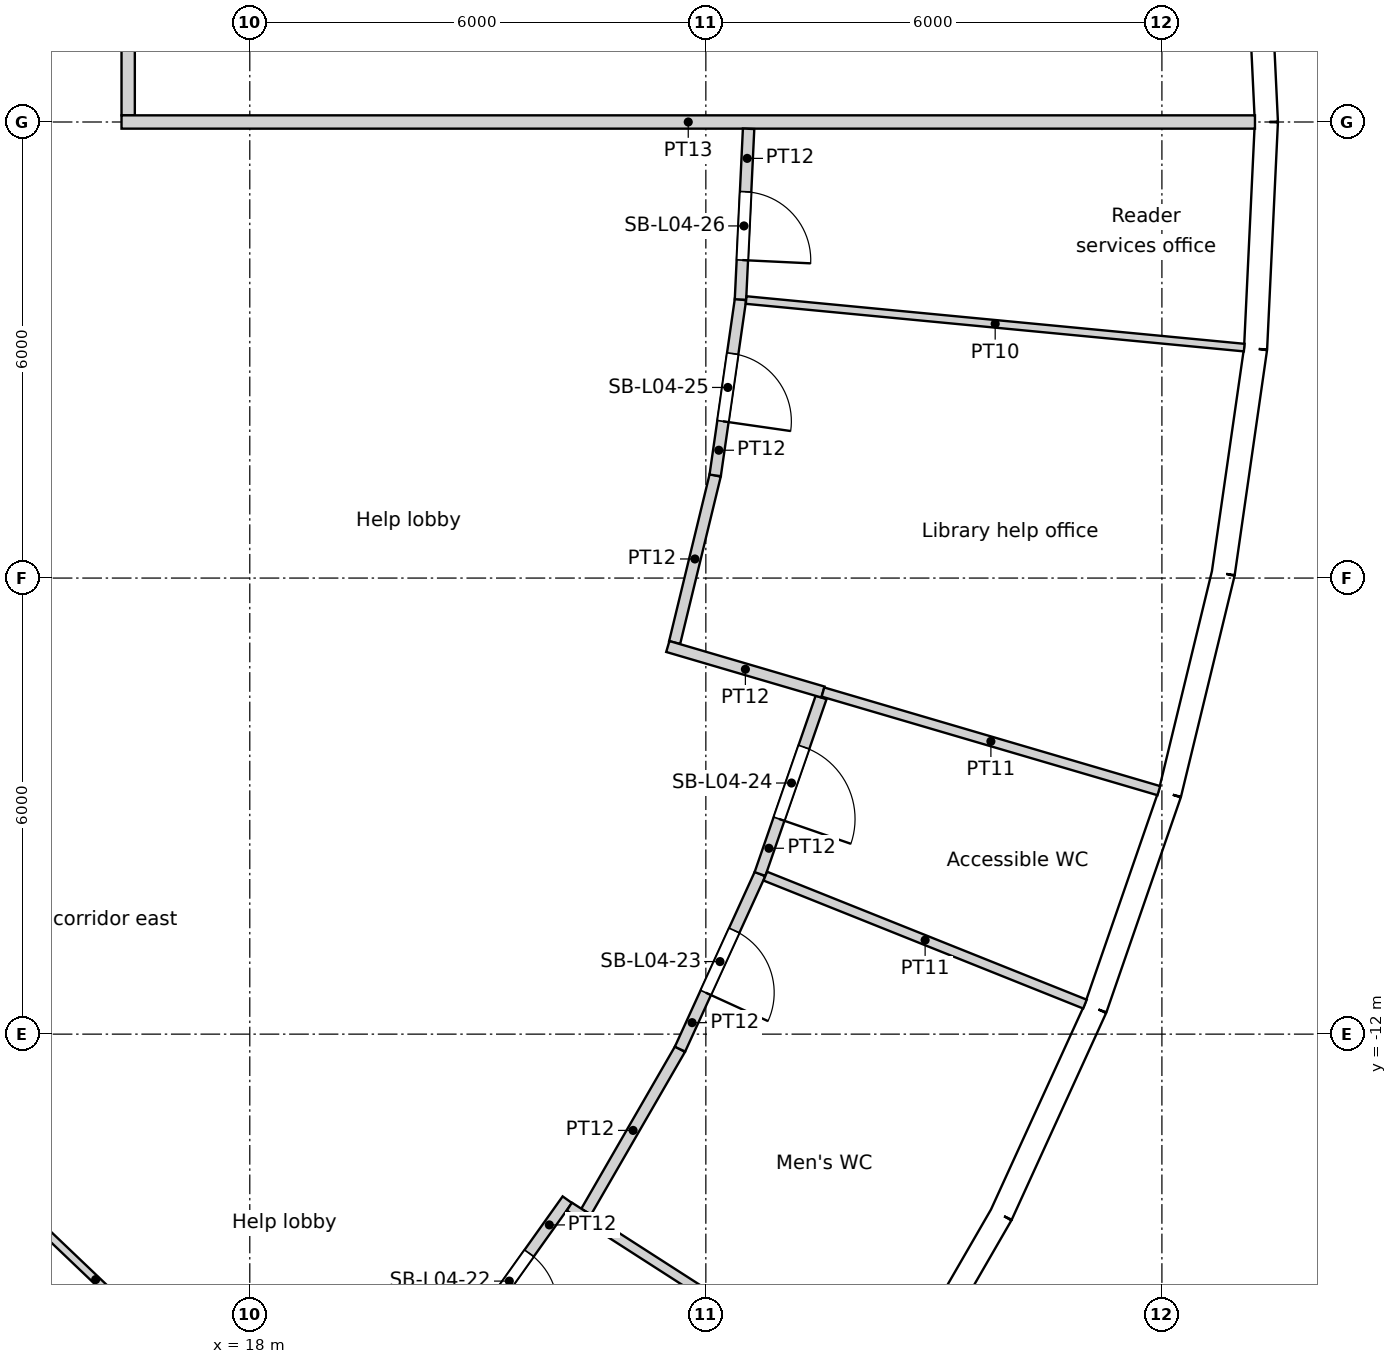
"""IFC4 building model, lengths in metres.
Left out: names, types, materials, properties, quantities, classifications, styles, units other than length and angle.
Written with IfcOpenShell. Run it as: python <this file> out.ifc"""

import sys

from ifc_helpers import new_model, si_unit, direction, frame, frame_2d, origin, origin_2d, place, context, subcontext, project, spatial, rectangle, circle, extrude, element, fill, save


model = new_model("IFC4")
c1 = context("Model", 3, precision=1e-05, world=origin(), true_north=direction((0.0, 1.0)))
c2 = subcontext(c1, "Body", "Model", "MODEL_VIEW")
j1 = project(units=[si_unit("LENGTHUNIT", "METRE"), si_unit("PLANEANGLEUNIT", "RADIAN")], contexts=[c1])
p1 = place(None, origin())
s1 = spatial("IfcSite", under=j1, at=p1, CompositionType="ELEMENT")
p2 = place(p1, origin())
s2 = spatial("IfcBuilding", under=s1, at=p2, CompositionType="ELEMENT")
p3 = place(p2, frame((0.0, 0.0, 23.4)))
s3 = spatial("IfcBuildingStorey", under=s2, at=p3, CompositionType="ELEMENT", Elevation=23.4)
for number, where, z_axis, x_axis in (
    (1, (30.275, 0.0, 0.0), (0.0, 0.0, 1.0), (1.0, 0.0, 0.0)),
    (2, (28.106, -11.252, 0.0), (0.0, 0.0, 1.0), (1.0, 0.0, 0.0)),
    (3, (29.728, -5.729, 0.0), (0.0, 0.0, 1.0), (1.0, 0.0, 0.0)),
):
    element("IfcColumn", number, at=place(p3, frame(where, z_axis=z_axis, x_axis=x_axis)), inside=s3, PredefinedType="COLUMN", context=c2, shape_type="SweptSolid", body=[
        extrude(circle(Radius=0.7, at=origin_2d()), origin(), (0.0, 0.0, 1.0), 4.8),
    ])
for number, where, z_axis, x_axis in (
    (4, (24.548, 0.0, 0.0), (0.0, 0.0, 1.0), (1.0, 0.0, 0.0)),
    (5, (18.805, -15.779, 0.0), (0.0, 0.0, 1.0), (1.0, 0.0, 0.0)),
    (6, (21.937, -11.017, 0.0), (0.0, 0.0, 1.0), (1.0, 0.0, 0.0)),
    (7, (23.886, -5.661, 0.0), (0.0, 0.0, 1.0), (1.0, 0.0, 0.0)),
):
    element("IfcColumn", number, at=place(p3, frame(where, z_axis=z_axis, x_axis=x_axis)), inside=s3, PredefinedType="COLUMN", context=c2, shape_type="SweptSolid", body=[
        extrude(circle(Radius=0.75, at=origin_2d()), origin(), (0.0, 0.0, 1.0), 4.8),
    ])
for number, where, z_axis, x_axis in (
    (8, (18.822, 0.0, 0.0), (0.0, 0.0, 1.0), (1.0, 0.0, 0.0)),
    (9, (15.552, -10.603, 0.0), (0.0, 0.0, 1.0), (1.0, 0.0, 0.0)),
    (10, (17.986, -5.548, 0.0), (0.0, 0.0, 1.0), (1.0, 0.0, 0.0)),
):
    element("IfcColumn", number, at=place(p3, frame(where, z_axis=z_axis, x_axis=x_axis)), inside=s3, PredefinedType="COLUMN", context=c2, shape_type="SweptSolid", body=[
        extrude(circle(Radius=0.8, at=origin_2d()), origin(), (0.0, 0.0, 1.0), 4.8),
    ])
p4 = place(p3, frame((31.375, 0.0, 0.0), z_axis=(0.0, 0.0, 1.0), x_axis=(-0.047588458579, 0.998867027492, 0.0)))
e11 = element("IfcWall", 11, at=p4, inside=s3, PredefinedType="SOLIDWALL", context=c2, shape_type="SweptSolid", body=[
    extrude(rectangle(XDim=2.986, YDim=0.3, at=frame_2d((1.493, 0.0))), origin(), (0.0, 0.0, 1.0), 3.85),
])
p5 = place(p4, frame((1.493, 0.0, 2.0)))
e12 = element("IfcOpeningElement", 12, at=p5, cuts=e11, PredefinedType="OPENING", context=c2, shape_type="SweptSolid", body=[
    extrude(circle(Radius=1.2, at=origin_2d()), frame((0.0, 0.16, 0.0), z_axis=(0.0, -1.0, 0.0), x_axis=(1.0, 0.0, 0.0)), (0.0, 0.0, 1.0), 0.32),
])
p6 = place(p3, frame((26.394, -16.962, 0.0), z_axis=(0.0, 0.0, 1.0), x_axis=(0.500017373705, 0.866015372839, 0.0)))
e13 = element("IfcWall", 13, at=p6, inside=s3, PredefinedType="SOLIDWALL", context=c2, shape_type="SweptSolid", body=[
    extrude(rectangle(XDim=2.986, YDim=0.3, at=frame_2d((1.493, 0.0))), origin(), (0.0, 0.0, 1.0), 3.85),
])
p7 = place(p6, frame((1.493, 0.0, 2.0)))
e14 = element("IfcOpeningElement", 14, at=p7, cuts=e13, PredefinedType="OPENING", context=c2, shape_type="SweptSolid", body=[
    extrude(circle(Radius=1.2, at=origin_2d()), frame((0.0, 0.16, 0.0), z_axis=(0.0, -1.0, 0.0), x_axis=(1.0, 0.0, 0.0)), (0.0, 0.0, 1.0), 0.32),
])
p8 = place(p3, frame((27.887, -14.377, 0.0), z_axis=(0.0, 0.0, 1.0), x_axis=(0.415373250944, 0.909651066289, 0.0)))
e15 = element("IfcWall", 15, at=p8, inside=s3, PredefinedType="SOLIDWALL", context=c2, shape_type="SweptSolid", body=[
    extrude(rectangle(XDim=2.986, YDim=0.3, at=frame_2d((1.493, 0.0))), origin(), (0.0, 0.0, 1.0), 4.35),
])
p9 = place(p8, frame((1.493, 0.0, 2.0)))
e16 = element("IfcOpeningElement", 16, at=p9, cuts=e15, PredefinedType="OPENING", context=c2, shape_type="SweptSolid", body=[
    extrude(circle(Radius=1.2, at=origin_2d()), frame((0.0, 0.16, 0.0), z_axis=(0.0, -1.0, 0.0), x_axis=(1.0, 0.0, 0.0)), (0.0, 0.0, 1.0), 0.32),
])
p10 = place(p3, frame((29.127, -11.661, 0.0), z_axis=(0.0, 0.0, 1.0), x_axis=(0.327074054052, 0.944998710669, 0.0)))
e17 = element("IfcWall", 17, at=p10, inside=s3, PredefinedType="SOLIDWALL", context=c2, shape_type="SweptSolid", body=[
    extrude(rectangle(XDim=2.986, YDim=0.3, at=frame_2d((1.493, 0.0))), origin(), (0.0, 0.0, 1.0), 4.35),
])
p11 = place(p10, frame((1.493, 0.0, 2.0)))
e18 = element("IfcOpeningElement", 18, at=p11, cuts=e17, PredefinedType="OPENING", context=c2, shape_type="SweptSolid", body=[
    extrude(circle(Radius=1.2, at=origin_2d()), frame((0.0, 0.16, 0.0), z_axis=(0.0, -1.0, 0.0), x_axis=(1.0, 0.0, 0.0)), (0.0, 0.0, 1.0), 0.32),
])
p12 = place(p3, frame((30.104, -8.839, 0.0), z_axis=(0.0, 0.0, 1.0), x_axis=(0.235756834479, 0.971812078026, 0.0)))
e19 = element("IfcWall", 19, at=p12, inside=s3, PredefinedType="SOLIDWALL", context=c2, shape_type="SweptSolid", body=[
    extrude(rectangle(XDim=2.986, YDim=0.3, at=frame_2d((1.493, 0.0))), origin(), (0.0, 0.0, 1.0), 3.85),
])
p13 = place(p12, frame((1.493, 0.0, 2.0)))
e20 = element("IfcOpeningElement", 20, at=p13, cuts=e19, PredefinedType="OPENING", context=c2, shape_type="SweptSolid", body=[
    extrude(circle(Radius=1.2, at=origin_2d()), frame((0.0, 0.16, 0.0), z_axis=(0.0, -1.0, 0.0), x_axis=(1.0, 0.0, 0.0)), (0.0, 0.0, 1.0), 0.32),
])
p14 = place(p3, frame((30.807, -5.938, 0.0), z_axis=(0.0, 0.0, 1.0), x_axis=(0.142360001917, 0.989814947278, 0.0)))
e21 = element("IfcWall", 21, at=p14, inside=s3, PredefinedType="SOLIDWALL", context=c2, shape_type="SweptSolid", body=[
    extrude(rectangle(XDim=2.986, YDim=0.3, at=frame_2d((1.493, 0.0))), origin(), (0.0, 0.0, 1.0), 4.35),
])
p15 = place(p14, frame((1.493, 0.0, 2.0)))
e22 = element("IfcOpeningElement", 22, at=p15, cuts=e21, PredefinedType="OPENING", context=c2, shape_type="SweptSolid", body=[
    extrude(circle(Radius=1.2, at=origin_2d()), frame((0.0, 0.16, 0.0), z_axis=(0.0, -1.0, 0.0), x_axis=(1.0, 0.0, 0.0)), (0.0, 0.0, 1.0), 0.32),
])
p16 = place(p3, frame((31.232, -2.982, 0.0), z_axis=(0.0, 0.0, 1.0), x_axis=(0.047588458579, 0.998867027492, 0.0)))
e23 = element("IfcWall", 23, at=p16, inside=s3, PredefinedType="SOLIDWALL", context=c2, shape_type="SweptSolid", body=[
    extrude(rectangle(XDim=2.986, YDim=0.3, at=frame_2d((1.493, 0.0))), origin(), (0.0, 0.0, 1.0), 4.35),
])
p17 = place(p16, frame((1.493, 0.0, 2.0)))
e24 = element("IfcOpeningElement", 24, at=p17, cuts=e23, PredefinedType="OPENING", context=c2, shape_type="SweptSolid", body=[
    extrude(circle(Radius=1.2, at=origin_2d()), frame((0.0, 0.16, 0.0), z_axis=(0.0, -1.0, 0.0), x_axis=(1.0, 0.0, 0.0)), (0.0, 0.0, 1.0), 0.32),
])
p18 = place(p3, frame((16.4, 6.566, 0.0), z_axis=(0.0, 0.0, 1.0), x_axis=(0.0, -1.0, 0.0)))
e25 = element("IfcWall", 25, at=p18, inside=s3, PredefinedType="PARTITIONING", context=c2, shape_type="SweptSolid", body=[
    extrude(rectangle(XDim=6.478, YDim=0.175, at=frame_2d((3.239, 0.0))), origin(), (0.0, 0.0, 1.0), 3.75),
])
p19 = place(p18, frame((4.277, 0.0, 0.0)))
e26 = element("IfcOpeningElement", 26, at=p19, cuts=e25, PredefinedType="OPENING", context=c2, shape_type="SweptSolid", body=[
    extrude(rectangle(XDim=1.0, YDim=2.1, at=frame_2d((0.5, 1.05))), frame((0.0, 0.087, 0.0), z_axis=(0.0, -1.0, 0.0), x_axis=(1.0, 0.0, 0.0)), (0.0, 0.0, 1.0), 0.175),
])
p20 = place(p18, frame((2.783, 0.0, 0.0)))
e27 = element("IfcOpeningElement", 27, at=p20, cuts=e25, PredefinedType="OPENING", context=c2, shape_type="SweptSolid", body=[
    extrude(rectangle(XDim=1.0, YDim=2.1, at=frame_2d((0.5, 1.05))), frame((0.0, 0.087, 0.0), z_axis=(0.0, -1.0, 0.0), x_axis=(1.0, 0.0, 0.0)), (0.0, 0.0, 1.0), 0.175),
])
p21 = place(p3, frame((18.939, -18.058, 0.0), z_axis=(0.0, 0.0, 1.0), x_axis=(-0.723743423805, 0.690069167909, 0.0)))
e28 = element("IfcWall", 28, at=p21, inside=s3, PredefinedType="PARTITIONING", context=c2, shape_type="SweptSolid", body=[
    extrude(rectangle(XDim=8.2, YDim=0.1, at=frame_2d((4.1, 0.0))), origin(), (0.0, 0.0, 1.0), 3.75),
])
p22 = place(p3, frame((22.177, -14.178, 0.0), z_axis=(0.0, 0.0, 1.0), x_axis=(-0.580050037968, -0.814580845253, 0.0)))
e29 = element("IfcWall", 29, at=p22, inside=s3, PredefinedType="PARTITIONING", context=c2, shape_type="SweptSolid", body=[
    extrude(rectangle(XDim=2.567, YDim=0.15, at=frame_2d((1.284, 0.0))), origin(), (0.0, 0.0, 1.0), 3.75),
])
p23 = place(p22, frame((0.865, 0.0, 0.0)))
e30 = element("IfcOpeningElement", 30, at=p23, cuts=e29, PredefinedType="OPENING", context=c2, shape_type="SweptSolid", body=[
    extrude(rectangle(XDim=0.9, YDim=2.1, at=frame_2d((0.45, 1.05))), frame((0.0, 0.075, 0.0), z_axis=(0.0, -1.0, 0.0), x_axis=(1.0, 0.0, 0.0)), (0.0, 0.0, 1.0), 0.15),
])
p24 = place(p3, frame((22.426, -14.336, 0.0), z_axis=(0.0, 0.0, 1.0), x_axis=(0.499967837645, 0.866043971933, 0.0)))
e31 = element("IfcWall", 31, at=p24, inside=s3, PredefinedType="PARTITIONING", context=c2, shape_type="SweptSolid", body=[
    extrude(rectangle(XDim=2.469, YDim=0.15, at=frame_2d((1.234, 0.0))), origin(), (0.0, 0.0, 1.0), 3.75),
])
p25 = place(p3, frame((23.589, -6.848, 0.0), z_axis=(0.0, 0.0, 1.0), x_axis=(0.235751338273, 0.971813411362, 0.0)))
e32 = element("IfcWall", 32, at=p25, inside=s3, PredefinedType="PARTITIONING", context=c2, shape_type="SweptSolid", body=[
    extrude(rectangle(XDim=2.263, YDim=0.15, at=frame_2d((1.131, 0.0))), origin(), (0.0, 0.0, 1.0), 3.75),
])
p26 = place(p3, frame((24.712, -9.893, 0.0), z_axis=(0.0, 0.0, 1.0), x_axis=(-0.415479591096, -0.909602500757, 0.0)))
e33 = element("IfcWall", 33, at=p26, inside=s3, PredefinedType="PARTITIONING", context=c2, shape_type="SweptSolid", body=[
    extrude(rectangle(XDim=2.533, YDim=0.15, at=frame_2d((1.267, 0.0))), origin(), (0.0, 0.0, 1.0), 3.75),
])
p27 = place(p26, frame((0.817, 0.0, 0.0)))
e34 = element("IfcOpeningElement", 34, at=p27, cuts=e33, PredefinedType="OPENING", context=c2, shape_type="SweptSolid", body=[
    extrude(rectangle(XDim=0.9, YDim=2.1, at=frame_2d((0.45, 1.05))), frame((0.0, 0.075, 0.0), z_axis=(0.0, -1.0, 0.0), x_axis=(1.0, 0.0, 0.0)), (0.0, 0.0, 1.0), 0.15),
])
p28 = place(p3, frame((24.456, -2.335, 0.0), z_axis=(0.0, 0.0, 1.0), x_axis=(-0.142327683086, -0.989819594991, 0.0)))
e35 = element("IfcWall", 35, at=p28, inside=s3, PredefinedType="PARTITIONING", context=c2, shape_type="SweptSolid", body=[
    extrude(rectangle(XDim=2.338, YDim=0.15, at=frame_2d((1.169, 0.0))), origin(), (0.0, 0.0, 1.0), 3.75),
])
p29 = place(p28, frame((0.719, 0.0, 0.0)))
e36 = element("IfcOpeningElement", 36, at=p29, cuts=e35, PredefinedType="OPENING", context=c2, shape_type="SweptSolid", body=[
    extrude(rectangle(XDim=0.9, YDim=2.1, at=frame_2d((0.45, 1.05))), frame((0.0, 0.075, 0.0), z_axis=(0.0, -1.0, 0.0), x_axis=(1.0, 0.0, 0.0)), (0.0, 0.0, 1.0), 0.15),
])
p30 = place(p3, frame((24.562, -0.089, 0.0), z_axis=(0.0, 0.0, 1.0), x_axis=(-0.047559990425, -0.998868383377, 0.0)))
e37 = element("IfcWall", 37, at=p30, inside=s3, PredefinedType="PARTITIONING", context=c2, shape_type="SweptSolid", body=[
    extrude(rectangle(XDim=2.248, YDim=0.15, at=frame_2d((1.124, 0.0))), origin(), (0.0, 0.0, 1.0), 3.75),
])
p31 = place(p30, frame((0.83, 0.0, 0.0)))
e38 = element("IfcOpeningElement", 38, at=p31, cuts=e37, PredefinedType="OPENING", context=c2, shape_type="SweptSolid", body=[
    extrude(rectangle(XDim=0.9, YDim=2.1, at=frame_2d((0.45, 1.05))), frame((0.0, 0.075, 0.0), z_axis=(0.0, -1.0, 0.0), x_axis=(1.0, 0.0, 0.0)), (0.0, 0.0, 1.0), 0.15),
])
p32 = place(p3, frame((25.516, -7.571, 0.0), z_axis=(0.0, 0.0, 1.0), x_axis=(-0.326994566999, -0.945026218236, 0.0)))
e39 = element("IfcWall", 39, at=p32, inside=s3, PredefinedType="PARTITIONING", context=c2, shape_type="SweptSolid", body=[
    extrude(rectangle(XDim=2.458, YDim=0.15, at=frame_2d((1.229, 0.0))), origin(), (0.0, 0.0, 1.0), 3.75),
])
p33 = place(p32, frame((0.691, 0.0, 0.0)))
e40 = element("IfcOpeningElement", 40, at=p33, cuts=e39, PredefinedType="OPENING", context=c2, shape_type="SweptSolid", body=[
    extrude(rectangle(XDim=1.0, YDim=2.1, at=frame_2d((0.5, 1.05))), frame((0.0, 0.075, 0.0), z_axis=(0.0, -1.0, 0.0), x_axis=(1.0, 0.0, 0.0)), (0.0, 0.0, 1.0), 0.15),
])
p34 = place(p3, frame((25.541, -7.5, 0.0), z_axis=(0.0, 0.0, 1.0), x_axis=(-0.959493318184, 0.281731383344, 0.0)))
e41 = element("IfcWall", 41, at=p34, inside=s3, PredefinedType="PARTITIONING", context=c2, shape_type="SweptSolid", body=[
    extrude(rectangle(XDim=2.127, YDim=0.15, at=frame_2d((1.064, 0.0))), origin(), (0.0, 0.0, 1.0), 3.75),
])
p35 = place(p3, frame((26.268, -16.881, 0.0), z_axis=(0.0, 0.0, 1.0), x_axis=(-0.841255646812, 0.540637528023, 0.0)))
e42 = element("IfcWall", 42, at=p35, inside=s3, PredefinedType="PARTITIONING", context=c2, shape_type="SweptSolid", body=[
    extrude(rectangle(XDim=4.831, YDim=0.125, at=frame_2d((2.415, 0.0))), origin(), (0.0, 0.0, 1.0), 3.75),
])
p36 = place(p3, frame((28.988, -11.605, 0.0), z_axis=(0.0, 0.0, 1.0), x_axis=(-0.928353988121, 0.371697286431, 0.0)))
e43 = element("IfcWall", 43, at=p36, inside=s3, PredefinedType="PARTITIONING", context=c2, shape_type="SweptSolid", body=[
    extrude(rectangle(XDim=4.53, YDim=0.125, at=frame_2d((2.265, 0.0))), origin(), (0.0, 0.0, 1.0), 3.75),
])
p37 = place(p3, frame((29.959, -8.797, 0.0), z_axis=(0.0, 0.0, 1.0), x_axis=(-0.959497930404, 0.281715675019, 0.0)))
e44 = element("IfcWall", 44, at=p37, inside=s3, PredefinedType="PARTITIONING", context=c2, shape_type="SweptSolid", body=[
    extrude(rectangle(XDim=4.605, YDim=0.125, at=frame_2d((2.303, 0.0))), origin(), (0.0, 0.0, 1.0), 3.75),
])
p38 = place(p3, frame((31.083, -2.968, 0.0), z_axis=(0.0, 0.0, 1.0), x_axis=(-0.995471604087, 0.095059378587, 0.0)))
e45 = element("IfcWall", 45, at=p38, inside=s3, PredefinedType="PARTITIONING", context=c2, shape_type="SweptSolid", body=[
    extrude(rectangle(XDim=6.583, YDim=0.1, at=frame_2d((3.291, 0.0))), origin(), (0.0, 0.0, 1.0), 3.75),
])
p39 = place(p3, frame((31.224, 0.0, 0.0), z_axis=(0.0, 0.0, 1.0), x_axis=(-1.0, 0.0, 0.0)))
e46 = element("IfcWall", 46, at=p39, inside=s3, PredefinedType="PARTITIONING", context=c2, shape_type="SweptSolid", body=[
    extrude(rectangle(XDim=14.912, YDim=0.175, at=frame_2d((7.456, 0.0))), origin(), (0.0, 0.0, 1.0), 3.75),
])
p40 = place(p5, origin())
e47 = element("IfcWindow", 47, at=p40, inside=s3, PartitioningType="SINGLE_PANEL", PredefinedType="WINDOW", context=c2, shape_type="SweptSolid", body=[
    extrude(circle(Radius=1.2, at=origin_2d()), frame((0.0, 0.12, 0.0), z_axis=(0.0, -1.0, 0.0), x_axis=(1.0, 0.0, 0.0)), (0.0, 0.0, 1.0), 0.1),
])
fill(e12, e47)
p41 = place(p7, origin())
e48 = element("IfcWindow", 48, at=p41, inside=s3, PartitioningType="SINGLE_PANEL", PredefinedType="WINDOW", context=c2, shape_type="SweptSolid", body=[
    extrude(circle(Radius=1.2, at=origin_2d()), frame((0.0, 0.12, 0.0), z_axis=(0.0, -1.0, 0.0), x_axis=(1.0, 0.0, 0.0)), (0.0, 0.0, 1.0), 0.1),
])
fill(e14, e48)
p42 = place(p9, origin())
e49 = element("IfcWindow", 49, at=p42, inside=s3, PartitioningType="SINGLE_PANEL", PredefinedType="WINDOW", context=c2, shape_type="SweptSolid", body=[
    extrude(circle(Radius=1.2, at=origin_2d()), frame((0.0, 0.12, 0.0), z_axis=(0.0, -1.0, 0.0), x_axis=(1.0, 0.0, 0.0)), (0.0, 0.0, 1.0), 0.1),
])
fill(e16, e49)
p43 = place(p11, origin())
e50 = element("IfcWindow", 50, at=p43, inside=s3, PartitioningType="SINGLE_PANEL", PredefinedType="WINDOW", context=c2, shape_type="SweptSolid", body=[
    extrude(circle(Radius=1.2, at=origin_2d()), frame((0.0, 0.12, 0.0), z_axis=(0.0, -1.0, 0.0), x_axis=(1.0, 0.0, 0.0)), (0.0, 0.0, 1.0), 0.1),
])
fill(e18, e50)
p44 = place(p13, origin())
e51 = element("IfcWindow", 51, at=p44, inside=s3, PartitioningType="SINGLE_PANEL", PredefinedType="WINDOW", context=c2, shape_type="SweptSolid", body=[
    extrude(circle(Radius=1.2, at=origin_2d()), frame((0.0, 0.12, 0.0), z_axis=(0.0, -1.0, 0.0), x_axis=(1.0, 0.0, 0.0)), (0.0, 0.0, 1.0), 0.1),
])
fill(e20, e51)
p45 = place(p15, origin())
e52 = element("IfcWindow", 52, at=p45, inside=s3, PartitioningType="SINGLE_PANEL", PredefinedType="WINDOW", context=c2, shape_type="SweptSolid", body=[
    extrude(circle(Radius=1.2, at=origin_2d()), frame((0.0, 0.12, 0.0), z_axis=(0.0, -1.0, 0.0), x_axis=(1.0, 0.0, 0.0)), (0.0, 0.0, 1.0), 0.1),
])
fill(e22, e52)
p46 = place(p17, origin())
e53 = element("IfcWindow", 53, at=p46, inside=s3, PartitioningType="SINGLE_PANEL", PredefinedType="WINDOW", context=c2, shape_type="SweptSolid", body=[
    extrude(circle(Radius=1.2, at=origin_2d()), frame((0.0, 0.12, 0.0), z_axis=(0.0, -1.0, 0.0), x_axis=(1.0, 0.0, 0.0)), (0.0, 0.0, 1.0), 0.1),
])
fill(e24, e53)
p47 = place(p23, origin())
e54 = element("IfcDoor", 54, at=p47, inside=s3, OperationType="SINGLE_SWING_RIGHT", PredefinedType="DOOR", context=c2, shape_type="SweptSolid", body=[
    extrude(rectangle(XDim=0.9, YDim=2.1, at=frame_2d((0.45, 1.05))), frame((0.0, 0.025, 0.0), z_axis=(0.0, -1.0, 0.0), x_axis=(1.0, 0.0, 0.0)), (0.0, 0.0, 1.0), 0.05),
])
fill(e30, e54)
p48 = place(p27, origin())
e55 = element("IfcDoor", 55, at=p48, inside=s3, OperationType="SINGLE_SWING_RIGHT", PredefinedType="DOOR", context=c2, shape_type="SweptSolid", body=[
    extrude(rectangle(XDim=0.9, YDim=2.1, at=frame_2d((0.45, 1.05))), frame((0.0, 0.025, 0.0), z_axis=(0.0, -1.0, 0.0), x_axis=(1.0, 0.0, 0.0)), (0.0, 0.0, 1.0), 0.05),
])
fill(e34, e55)
p49 = place(p33, origin())
e56 = element("IfcDoor", 56, at=p49, inside=s3, OperationType="SINGLE_SWING_RIGHT", PredefinedType="DOOR", context=c2, shape_type="SweptSolid", body=[
    extrude(rectangle(XDim=1.0, YDim=2.1, at=frame_2d((0.5, 1.05))), frame((0.0, 0.025, 0.0), z_axis=(0.0, -1.0, 0.0), x_axis=(1.0, 0.0, 0.0)), (0.0, 0.0, 1.0), 0.05),
])
fill(e40, e56)
p50 = place(p29, origin())
e57 = element("IfcDoor", 57, at=p50, inside=s3, OperationType="SINGLE_SWING_RIGHT", PredefinedType="DOOR", context=c2, shape_type="SweptSolid", body=[
    extrude(rectangle(XDim=0.9, YDim=2.1, at=frame_2d((0.45, 1.05))), frame((0.0, 0.025, 0.0), z_axis=(0.0, -1.0, 0.0), x_axis=(1.0, 0.0, 0.0)), (0.0, 0.0, 1.0), 0.05),
])
fill(e36, e57)
p51 = place(p31, origin())
e58 = element("IfcDoor", 58, at=p51, inside=s3, OperationType="SINGLE_SWING_RIGHT", PredefinedType="DOOR", context=c2, shape_type="SweptSolid", body=[
    extrude(rectangle(XDim=0.9, YDim=2.1, at=frame_2d((0.45, 1.05))), frame((0.0, 0.025, 0.0), z_axis=(0.0, -1.0, 0.0), x_axis=(1.0, 0.0, 0.0)), (0.0, 0.0, 1.0), 0.05),
])
fill(e38, e58)
save(model, sys.argv[1])
